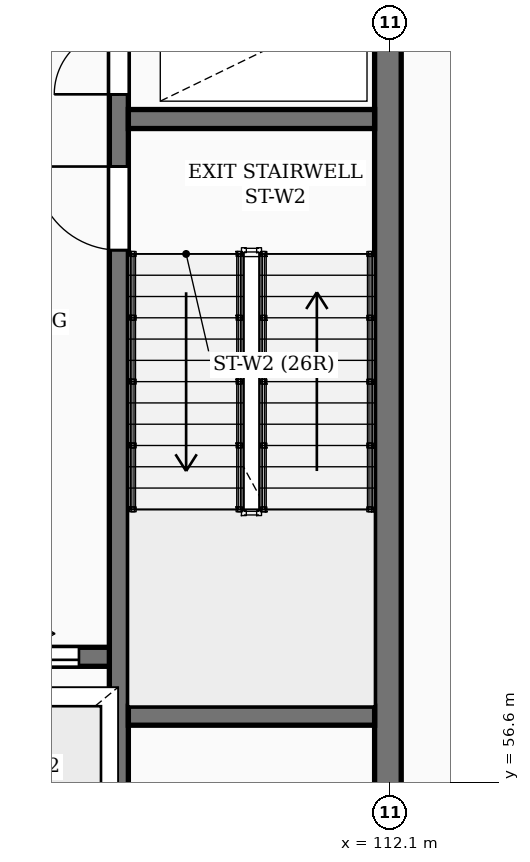
"""IFC4 building model, lengths in metres.
Left out: names, types, materials, properties, quantities, classifications, styles, units other than length and angle.
Written with IfcOpenShell. Run it as: python <this file> out.ifc"""

import sys

from ifc_helpers import new_model, si_unit, direction, frame, frame_2d, origin, place, context, subcontext, project, spatial, rectangle, extrude, element, fill, save


model = new_model("IFC4")
c1 = context("Model", 3, precision=1e-05, world=origin(), true_north=direction((0.0, 1.0)))
c2 = subcontext(c1, "Body", "Model", "MODEL_VIEW")
j1 = project(units=[si_unit("LENGTHUNIT", "METRE"), si_unit("PLANEANGLEUNIT", "RADIAN")], contexts=[c1])
p1 = place(None, origin())
s1 = spatial("IfcSite", under=j1, at=p1, CompositionType="ELEMENT")
p2 = place(p1, origin())
s2 = spatial("IfcBuilding", under=s1, at=p2, CompositionType="ELEMENT")
p3 = place(p2, frame((0.0, 0.0, 5.4)))
s3 = spatial("IfcBuildingStorey", under=s2, at=p3, CompositionType="ELEMENT", Elevation=5.4)
p4 = place(p3, frame((112.075, 55.375, 0.0), z_axis=(0.0, 0.0, 1.0), x_axis=(0.0, 1.0, 0.0)))
e1 = element("IfcWall", 1, at=p4, inside=s3, PredefinedType="SHEAR", context=c2, shape_type="SweptSolid", body=[
    extrude(rectangle(XDim=11.65, YDim=0.35, at=frame_2d((5.825, 0.0))), origin(), (0.0, 0.0, 1.0), 4.6),
])
p5 = place(p3, frame((106.22, 58.25, 0.0), z_axis=(0.0, 0.0, 1.0), x_axis=(1.0, 0.0, 0.0)))
e2 = element("IfcWall", 2, at=p5, inside=s3, PredefinedType="SHEAR", context=c2, shape_type="SweptSolid", body=[
    extrude(rectangle(XDim=2.46, YDim=0.25, at=frame_2d((1.23, 0.0))), origin(), (0.0, 0.0, 1.0), 4.6),
])
p6 = place(p5, frame((0.67, 0.0, 0.0)))
e3 = element("IfcOpeningElement", 3, at=p6, cuts=e2, PredefinedType="OPENING", context=c2, shape_type="SweptSolid", body=[
    extrude(rectangle(XDim=1.12, YDim=2.12, at=frame_2d((0.56, 1.06))), frame((0.0, 0.135, 0.0), z_axis=(0.0, -1.0, 0.0), x_axis=(1.0, 0.0, 0.0)), (0.0, 0.0, 1.0), 0.27),
])
p7 = place(p3, frame((108.535, 55.4, 0.0), z_axis=(0.0, 0.0, 1.0), x_axis=(0.0, 1.0, 0.0)))
e4 = element("IfcWall", 4, at=p7, inside=s3, PredefinedType="SHEAR", context=c2, shape_type="SweptSolid", body=[
    extrude(rectangle(XDim=11.6, YDim=0.25, at=frame_2d((5.8, 0.0))), origin(), (0.0, 0.0, 1.0), 4.6),
])
p8 = place(p7, frame((8.2, 0.0, 0.0)))
e5 = element("IfcOpeningElement", 5, at=p8, cuts=e4, PredefinedType="OPENING", context=c2, shape_type="SweptSolid", body=[
    extrude(rectangle(XDim=1.1, YDim=2.1, at=frame_2d((0.55, 1.05))), frame((0.0, 0.135, 0.0), z_axis=(0.0, -1.0, 0.0), x_axis=(1.0, 0.0, 0.0)), (0.0, 0.0, 1.0), 0.27),
])
p9 = place(p7, frame((10.25, 0.0, 0.0)))
e6 = element("IfcOpeningElement", 6, at=p9, cuts=e4, PredefinedType="OPENING", context=c2, shape_type="SweptSolid", body=[
    extrude(rectangle(XDim=0.85, YDim=2.05, at=frame_2d((0.425, 1.025))), frame((0.0, 0.135, 0.0), z_axis=(0.0, -1.0, 0.0), x_axis=(1.0, 0.0, 0.0)), (0.0, 0.0, 1.0), 0.27),
])
for number, where, z_axis, x_axis in (
    (7, (108.66, 57.475, 0.0), (0.0, 0.0, 1.0), (1.0, 0.0, 0.0)),
    (8, (108.66, 65.325, 0.0), (0.0, 0.0, 1.0), (1.0, 0.0, 0.0)),
):
    element("IfcWall", number, at=place(p3, frame(where, z_axis=z_axis, x_axis=x_axis)), inside=s3, PredefinedType="SHEAR", context=c2, shape_type="SweptSolid", body=[
        extrude(rectangle(XDim=3.24, YDim=0.25, at=frame_2d((1.62, 0.0))), origin(), (0.0, 0.0, 1.0), 4.6),
    ])
p10 = place(p6, origin())
e9 = element("IfcDoor", 9, at=p10, inside=s3, OperationType="SLIDING_TO_RIGHT", PredefinedType="DOOR", context=c2, shape_type="SweptSolid", body=[
    extrude(rectangle(XDim=1.12, YDim=2.12, at=frame_2d((0.56, 1.06))), frame((0.0, 0.025, 0.0), z_axis=(0.0, -1.0, 0.0), x_axis=(1.0, 0.0, 0.0)), (0.0, 0.0, 1.0), 0.05),
])
fill(e3, e9)
p11 = place(p8, origin())
e10 = element("IfcDoor", 10, at=p11, inside=s3, OperationType="SINGLE_SWING_RIGHT", PredefinedType="DOOR", context=c2, shape_type="SweptSolid", body=[
    extrude(rectangle(XDim=1.1, YDim=2.1, at=frame_2d((0.55, 1.05))), frame((0.0, 0.025, 0.0), z_axis=(0.0, -1.0, 0.0), x_axis=(1.0, 0.0, 0.0)), (0.0, 0.0, 1.0), 0.05),
])
fill(e5, e10)
p12 = place(p9, origin())
e11 = element("IfcDoor", 11, at=p12, inside=s3, OperationType="SINGLE_SWING_LEFT", PredefinedType="DOOR", context=c2, shape_type="SweptSolid", body=[
    extrude(rectangle(XDim=0.85, YDim=2.05, at=frame_2d((0.425, 1.025))), frame((0.0, 0.025, 0.0), z_axis=(0.0, -1.0, 0.0), x_axis=(1.0, 0.0, 0.0)), (0.0, 0.0, 1.0), 0.05),
])
fill(e6, e11)
save(model, sys.argv[1])
